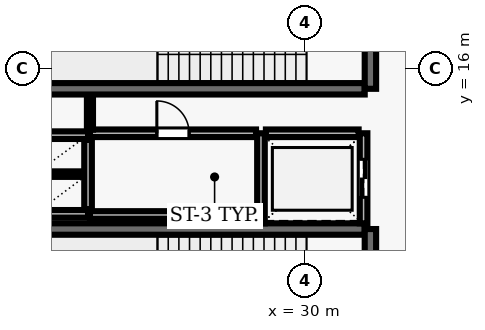
"""IFC4 building model, lengths in metres.
Left out: names, types, materials, properties, quantities, classifications, styles, units other than length and angle.
Written with IfcOpenShell. Run it as: python <this file> out.ifc"""

import sys

from ifc_helpers import new_model, si_unit, direction, frame, frame_2d, origin, place, context, subcontext, project, spatial, rectangle, extrude, element, fill, save


model = new_model("IFC4")
c1 = context("Model", 3, precision=1e-05, world=origin(), true_north=direction((0.0, 1.0)))
c2 = subcontext(c1, "Body", "Model", "MODEL_VIEW")
j1 = project(units=[si_unit("LENGTHUNIT", "METRE"), si_unit("PLANEANGLEUNIT", "RADIAN")], contexts=[c1])
p1 = place(None, origin())
s1 = spatial("IfcSite", under=j1, at=p1, CompositionType="ELEMENT")
p2 = place(p1, origin())
s2 = spatial("IfcBuilding", under=s1, at=p2, CompositionType="ELEMENT")
p3 = place(p2, frame((0.0, 0.0, 170.8)))
s3 = spatial("IfcBuildingStorey", under=s2, at=p3, CompositionType="ELEMENT", Elevation=170.8)
p4 = place(p3, frame((23.22, 15.47, 0.0), z_axis=(0.0, 0.0, 1.0), x_axis=(1.0, 0.0, 0.0)))
e1 = element("IfcWall", 1, at=p4, inside=s3, PredefinedType="SHEAR", context=c2, shape_type="SweptSolid", body=[
    extrude(rectangle(XDim=8.36, YDim=0.3, at=frame_2d((4.18, 0.0))), origin(), (0.0, 0.0, 1.0), 4.79),
])
p5 = place(p3, frame((31.73, 15.47, 0.0), z_axis=(0.0, 0.0, 1.0), x_axis=(0.0, 1.0, 0.0)))
e2 = element("IfcWall", 2, at=p5, inside=s3, PredefinedType="SHEAR", context=c2, shape_type="SweptSolid", body=[
    extrude(rectangle(XDim=3.51, YDim=0.3, at=frame_2d((1.755, 0.0))), origin(), (0.0, 0.0, 1.0), 4.79),
])
p6 = place(p5, frame((1.18, 0.0, 0.0)))
e3 = element("IfcOpeningElement", 3, at=p6, cuts=e2, PredefinedType="OPENING", context=c2, shape_type="SweptSolid", body=[
    extrude(rectangle(XDim=1.15, YDim=2.15, at=frame_2d((0.575, 1.075))), frame((0.0, 0.16, 0.0), z_axis=(0.0, -1.0, 0.0), x_axis=(1.0, 0.0, 0.0)), (0.0, 0.0, 1.0), 0.32),
])
p7 = place(p3, frame((31.58, 11.78, 0.0), z_axis=(0.0, 0.0, 1.0), x_axis=(-1.0, 0.0, 0.0)))
e4 = element("IfcWall", 4, at=p7, inside=s3, PredefinedType="SHEAR", context=c2, shape_type="SweptSolid", body=[
    extrude(rectangle(XDim=8.36, YDim=0.3, at=frame_2d((4.18, 0.0))), origin(), (0.0, 0.0, 1.0), 4.79),
])
p8 = place(p3, frame((31.73, 8.27, 0.0), z_axis=(0.0, 0.0, 1.0), x_axis=(0.0, 1.0, 0.0)))
e5 = element("IfcWall", 5, at=p8, inside=s3, PredefinedType="SHEAR", context=c2, shape_type="SweptSolid", body=[
    extrude(rectangle(XDim=3.51, YDim=0.3, at=frame_2d((1.755, 0.0))), origin(), (0.0, 0.0, 1.0), 4.79),
])
p9 = place(p8, frame((1.18, 0.0, 0.0)))
e6 = element("IfcOpeningElement", 6, at=p9, cuts=e5, PredefinedType="OPENING", context=c2, shape_type="SweptSolid", body=[
    extrude(rectangle(XDim=1.15, YDim=2.15, at=frame_2d((0.575, 1.075))), frame((0.0, 0.16, 0.0), z_axis=(0.0, -1.0, 0.0), x_axis=(1.0, 0.0, 0.0)), (0.0, 0.0, 1.0), 0.32),
])
p10 = place(p3, frame((28.85, 14.3, 0.0), z_axis=(0.0, 0.0, 1.0), x_axis=(0.0, -1.0, 0.0)))
e7 = element("IfcWall", 7, at=p10, inside=s3, PredefinedType="SOLIDWALL", context=c2, shape_type="SweptSolid", body=[
    extrude(rectangle(XDim=2.37, YDim=0.2, at=frame_2d((1.185, 0.0))), origin(), (0.0, 0.0, 1.0), 4.79),
])
p11 = place(p3, frame((31.55, 11.93, 0.0), z_axis=(0.0, 0.0, 1.0), x_axis=(0.0, 1.0, 0.0)))
e8 = element("IfcWall", 8, at=p11, inside=s3, PredefinedType="SOLIDWALL", context=c2, shape_type="SweptSolid", body=[
    extrude(rectangle(XDim=2.37, YDim=0.2, at=frame_2d((1.185, 0.0))), origin(), (0.0, 0.0, 1.0), 4.79),
])
p12 = place(p11, frame((0.685, 0.0, 0.0)))
e9 = element("IfcOpeningElement", 9, at=p12, cuts=e8, PredefinedType="OPENING", context=c2, shape_type="SweptSolid", body=[
    extrude(rectangle(XDim=1.0, YDim=2.1, at=frame_2d((0.5, 1.05))), frame((0.0, 0.11, 0.0), z_axis=(0.0, -1.0, 0.0), x_axis=(1.0, 0.0, 0.0)), (0.0, 0.0, 1.0), 0.22),
])
p13 = place(p3, frame((31.42, 14.3, 0.0), z_axis=(0.0, 0.0, 1.0), x_axis=(-1.0, 0.0, 0.0)))
e10 = element("IfcWall", 10, at=p13, inside=s3, PredefinedType="SOLIDWALL", context=c2, shape_type="SweptSolid", body=[
    extrude(rectangle(XDim=2.44, YDim=0.2, at=frame_2d((1.22, 0.0))), origin(), (0.0, 0.0, 1.0), 4.79),
])
for number, where, z_axis, x_axis in (
    (11, (22.9, 14.25, 0.0), (0.0, 0.0, 1.0), (1.0, 0.0, 0.0)),
    (12, (22.9, 12.18, 0.0), (0.0, 0.0, 1.0), (1.0, 0.0, 0.0)),
):
    element("IfcWall", number, at=place(p3, frame(where, z_axis=z_axis, x_axis=x_axis)), inside=s3, PredefinedType="SOLIDWALL", context=c2, shape_type="SweptSolid", body=[
        extrude(rectangle(XDim=1.4, YDim=0.2, at=frame_2d((0.7, 0.0))), origin(), (0.0, 0.0, 1.0), 4.79),
    ])
p14 = place(p3, frame((24.3, 12.3, 0.0), z_axis=(0.0, 0.0, 1.0), x_axis=(0.0, 1.0, 0.0)))
e13 = element("IfcWall", 13, at=p14, inside=s3, PredefinedType="SOLIDWALL", context=c2, shape_type="SweptSolid", body=[
    extrude(rectangle(XDim=1.83, YDim=0.2, at=frame_2d((0.915, 0.0))), origin(), (0.0, 0.0, 1.0), 4.79),
])
p15 = place(p3, frame((23.01, 13.225, 0.0), z_axis=(0.0, 0.0, 1.0), x_axis=(1.0, 0.0, 0.0)))
e14 = element("IfcWall", 14, at=p15, inside=s3, PredefinedType="PARTITIONING", context=c2, shape_type="SweptSolid", body=[
    extrude(rectangle(XDim=1.18, YDim=0.145, at=frame_2d((0.59, 0.0))), origin(), (0.0, 0.0, 1.0), 4.79),
])
p16 = place(p3, frame((24.35, 12.15, 0.0), z_axis=(0.0, 0.0, 1.0), x_axis=(1.0, 0.0, 0.0)))
e15 = element("IfcWall", 15, at=p16, inside=s3, PredefinedType="SOLIDWALL", context=c2, shape_type="SweptSolid", body=[
    extrude(rectangle(XDim=4.37, YDim=0.2, at=frame_2d((2.185, 0.0))), origin(), (0.0, 0.0, 1.0), 4.79),
])
p17 = place(p3, frame((24.35, 14.3, 0.0), z_axis=(0.0, 0.0, 1.0), x_axis=(1.0, 0.0, 0.0)))
e16 = element("IfcWall", 16, at=p17, inside=s3, PredefinedType="SOLIDWALL", context=c2, shape_type="SweptSolid", body=[
    extrude(rectangle(XDim=4.37, YDim=0.2, at=frame_2d((2.185, 0.0))), origin(), (0.0, 0.0, 1.0), 4.79),
])
p18 = place(p17, frame((1.76, 0.0, 0.0)))
e17 = element("IfcOpeningElement", 17, at=p18, cuts=e16, PredefinedType="OPENING", context=c2, shape_type="SweptSolid", body=[
    extrude(rectangle(XDim=0.85, YDim=2.1, at=frame_2d((0.425, 1.05))), frame((0.0, 0.11, 0.0), z_axis=(0.0, -1.0, 0.0), x_axis=(1.0, 0.0, 0.0)), (0.0, 0.0, 1.0), 0.22),
])
p19 = place(p3, frame((24.35, 15.29, 0.0), z_axis=(0.0, 0.0, 1.0), x_axis=(0.0, -1.0, 0.0)))
e18 = element("IfcWall", 18, at=p19, inside=s3, PredefinedType="PARTITIONING", context=c2, shape_type="SweptSolid", body=[
    extrude(rectangle(XDim=0.895, YDim=0.16, at=frame_2d((0.448, 0.0))), origin(), (0.0, 0.0, 1.0), 4.79),
])
p20 = place(p12, origin())
e19 = element("IfcDoor", 19, at=p20, inside=s3, OperationType="DOUBLE_DOOR_SLIDING", PredefinedType="DOOR", context=c2, shape_type="SweptSolid", body=[
    extrude(rectangle(XDim=1.0, YDim=2.1, at=frame_2d((0.5, 1.05))), frame((0.0, 0.025, 0.0), z_axis=(0.0, -1.0, 0.0), x_axis=(1.0, 0.0, 0.0)), (0.0, 0.0, 1.0), 0.05),
])
fill(e9, e19)
p21 = place(p18, origin())
e20 = element("IfcDoor", 20, at=p21, inside=s3, OperationType="SINGLE_SWING_LEFT", PredefinedType="DOOR", context=c2, shape_type="SweptSolid", body=[
    extrude(rectangle(XDim=0.85, YDim=2.1, at=frame_2d((0.425, 1.05))), frame((0.0, 0.025, 0.0), z_axis=(0.0, -1.0, 0.0), x_axis=(1.0, 0.0, 0.0)), (0.0, 0.0, 1.0), 0.05),
])
fill(e17, e20)
save(model, sys.argv[1])
